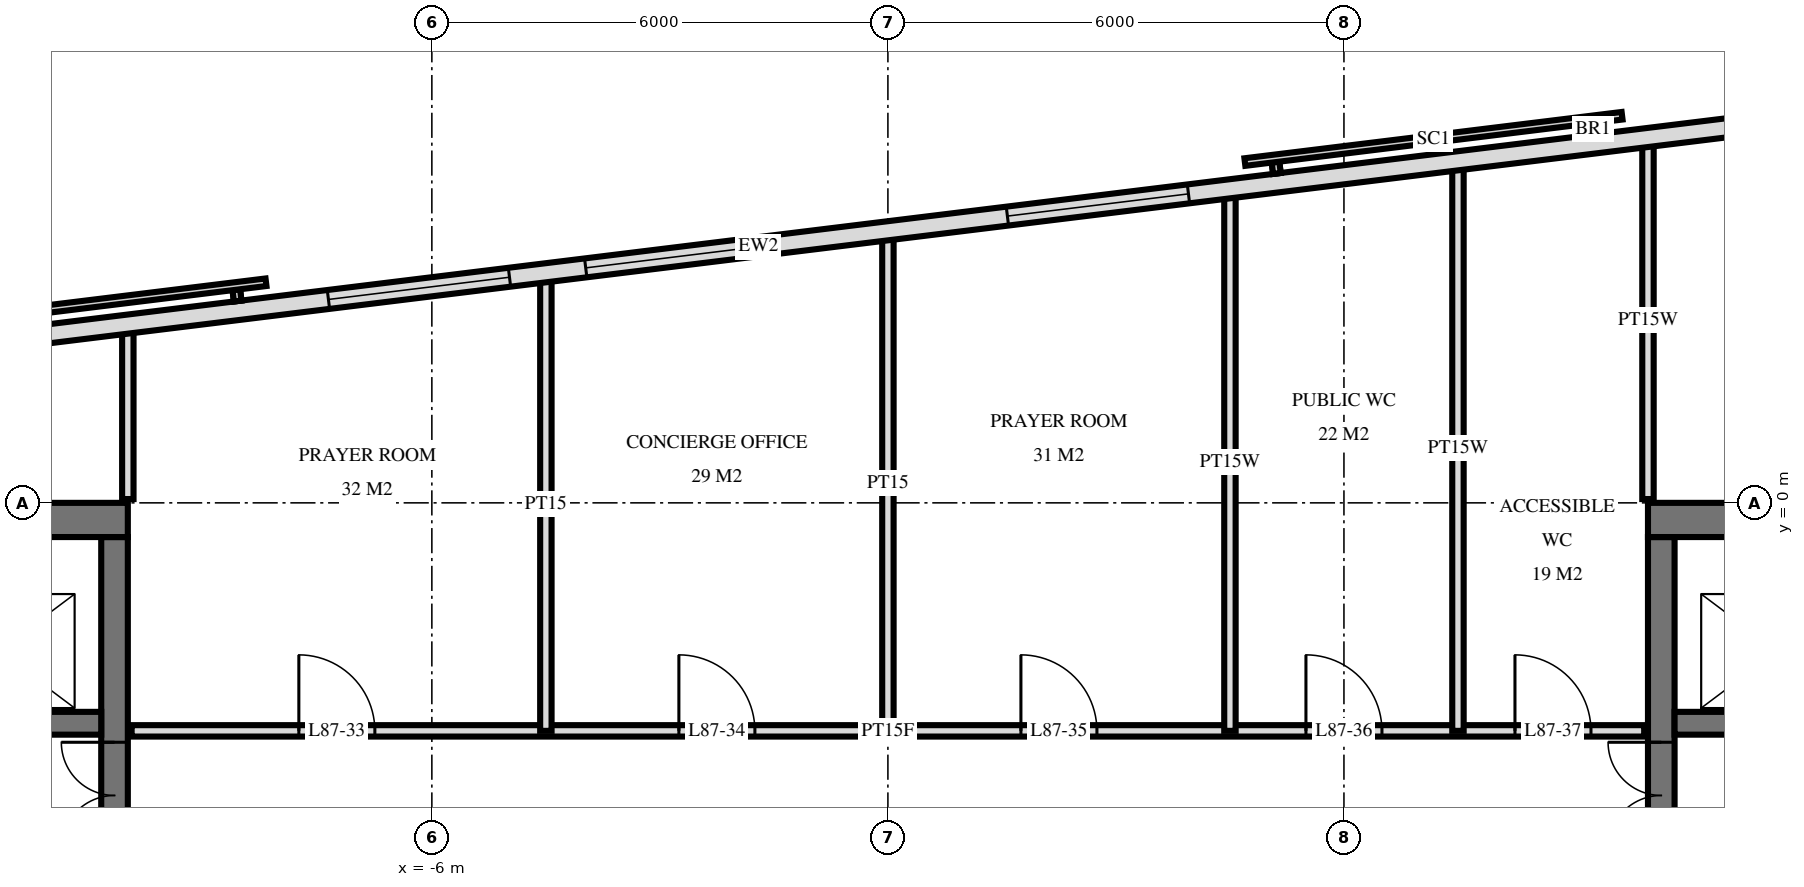
"""IFC4 building model, lengths in metres.
Left out: names, types, materials, properties, quantities, classifications, styles, units other than length and angle.
Written with IfcOpenShell. Run it as: python <this file> out.ifc"""

import sys

from ifc_helpers import new_model, si_unit, direction, frame, frame_2d, origin, place, context, subcontext, project, spatial, rectangle, extrude, element, fill, save


model = new_model("IFC4")
c1 = context("Model", 3, precision=1e-05, world=origin(), true_north=direction((0.0, 1.0)))
c2 = subcontext(c1, "Body", "Model", "MODEL_VIEW")
j1 = project(units=[si_unit("LENGTHUNIT", "METRE"), si_unit("PLANEANGLEUNIT", "RADIAN")], contexts=[c1])
p1 = place(None, origin())
s1 = spatial("IfcSite", under=j1, at=p1, CompositionType="ELEMENT")
p2 = place(p1, origin())
s2 = spatial("IfcBuilding", under=s1, at=p2, CompositionType="ELEMENT")
p3 = place(p2, frame((0.0, 0.0, 330.6)))
s3 = spatial("IfcBuildingStorey", under=s2, at=p3, CompositionType="ELEMENT", Elevation=330.6)
p4 = place(p3, frame((-19.5, -0.225, 0.0), z_axis=(0.0, 0.0, 1.0), x_axis=(1.0, 0.0, 0.0)))
e1 = element("IfcWall", 1, at=p4, inside=s3, PredefinedType="SHEAR", context=c2, shape_type="SweptSolid", body=[
    extrude(rectangle(XDim=9.5, YDim=0.45, at=frame_2d((4.75, 0.0))), origin(), (0.0, 0.0, 1.0), 4.0),
])
p5 = place(p3, frame((-10.175, -14.55, 0.0), z_axis=(0.0, 0.0, 1.0), x_axis=(0.0, 1.0, 0.0)))
e2 = element("IfcWall", 2, at=p5, inside=s3, PredefinedType="SHEAR", context=c2, shape_type="SweptSolid", body=[
    extrude(rectangle(XDim=14.1, YDim=0.35, at=frame_2d((7.05, 0.0))), origin(), (0.0, 0.0, 1.0), 4.0),
])
p6 = place(p5, frame((8.4, 0.0, 0.0)))
e3 = element("IfcOpeningElement", 3, at=p6, cuts=e2, PredefinedType="OPENING", context=c2, shape_type="SweptSolid", body=[
    extrude(rectangle(XDim=1.4, YDim=2.4, at=frame_2d((0.7, 1.2))), frame((0.0, 0.185, 0.0), z_axis=(0.0, -1.0, 0.0), x_axis=(1.0, 0.0, 0.0)), (0.0, 0.0, 1.0), 0.37),
])
p7 = place(p5, frame((10.0, 0.0, 0.0)))
e4 = element("IfcOpeningElement", 4, at=p7, cuts=e2, PredefinedType="OPENING", context=c2, shape_type="SweptSolid", body=[
    extrude(rectangle(XDim=1.4, YDim=2.4, at=frame_2d((0.7, 1.2))), frame((0.0, 0.185, 0.0), z_axis=(0.0, -1.0, 0.0), x_axis=(1.0, 0.0, 0.0)), (0.0, 0.0, 1.0), 0.37),
])
p8 = place(p5, frame((4.0, 0.0, 0.0)))
e5 = element("IfcOpeningElement", 5, at=p8, cuts=e2, PredefinedType="OPENING", context=c2, shape_type="SweptSolid", body=[
    extrude(rectangle(XDim=1.2, YDim=2.1, at=frame_2d((0.6, 1.05))), frame((0.0, 0.185, 0.0), z_axis=(0.0, -1.0, 0.0), x_axis=(1.0, 0.0, 0.0)), (0.0, 0.0, 1.0), 0.37),
])
p9 = place(p3, frame((-19.05, -2.9, 0.0), z_axis=(0.0, 0.0, 1.0), x_axis=(1.0, 0.0, 0.0)))
e6 = element("IfcWall", 6, at=p9, inside=s3, PredefinedType="SHEAR", context=c2, shape_type="SweptSolid", body=[
    extrude(rectangle(XDim=8.7, YDim=0.3, at=frame_2d((4.35, 0.0))), origin(), (0.0, 0.0, 1.0), 4.0),
])
p10 = place(p9, frame((6.8, 0.0, 0.0)))
e7 = element("IfcOpeningElement", 7, at=p10, cuts=e6, PredefinedType="OPENING", context=c2, shape_type="SweptSolid", body=[
    extrude(rectangle(XDim=1.1, YDim=2.1, at=frame_2d((0.55, 1.05))), frame((0.0, 0.16, 0.0), z_axis=(0.0, -1.0, 0.0), x_axis=(1.0, 0.0, 0.0)), (0.0, 0.0, 1.0), 0.32),
])
p11 = place(p9, frame((3.8, 0.0, 0.0)))
e8 = element("IfcOpeningElement", 8, at=p11, cuts=e6, PredefinedType="OPENING", context=c2, shape_type="SweptSolid", body=[
    extrude(rectangle(XDim=1.1, YDim=2.1, at=frame_2d((0.55, 1.05))), frame((0.0, 0.16, 0.0), z_axis=(0.0, -1.0, 0.0), x_axis=(1.0, 0.0, 0.0)), (0.0, 0.0, 1.0), 0.32),
])
p12 = place(p9, frame((1.613, 0.0, 0.0)))
e9 = element("IfcOpeningElement", 9, at=p12, cuts=e6, PredefinedType="OPENING", context=c2, shape_type="SweptSolid", body=[
    extrude(rectangle(XDim=0.9, YDim=2.1, at=frame_2d((0.45, 1.05))), frame((0.0, 0.16, 0.0), z_axis=(0.0, -1.0, 0.0), x_axis=(1.0, 0.0, 0.0)), (0.0, 0.0, 1.0), 0.32),
])
p13 = place(p9, frame((0.188, 0.0, 0.0)))
e10 = element("IfcOpeningElement", 10, at=p13, cuts=e6, PredefinedType="OPENING", context=c2, shape_type="SweptSolid", body=[
    extrude(rectangle(XDim=0.9, YDim=2.1, at=frame_2d((0.45, 1.05))), frame((0.0, 0.16, 0.0), z_axis=(0.0, -1.0, 0.0), x_axis=(1.0, 0.0, 0.0)), (0.0, 0.0, 1.0), 0.32),
])
p14 = place(p3, frame((10.0, -0.225, 0.0), z_axis=(0.0, 0.0, 1.0), x_axis=(1.0, 0.0, 0.0)))
e11 = element("IfcWall", 11, at=p14, inside=s3, PredefinedType="SHEAR", context=c2, shape_type="SweptSolid", body=[
    extrude(rectangle(XDim=9.5, YDim=0.45, at=frame_2d((4.75, 0.0))), origin(), (0.0, 0.0, 1.0), 4.0),
])
p15 = place(p3, frame((10.175, -14.55, 0.0), z_axis=(0.0, 0.0, 1.0), x_axis=(0.0, 1.0, 0.0)))
e12 = element("IfcWall", 12, at=p15, inside=s3, PredefinedType="SHEAR", context=c2, shape_type="SweptSolid", body=[
    extrude(rectangle(XDim=14.1, YDim=0.35, at=frame_2d((7.05, 0.0))), origin(), (0.0, 0.0, 1.0), 4.0),
])
p16 = place(p15, frame((8.4, 0.0, 0.0)))
e13 = element("IfcOpeningElement", 13, at=p16, cuts=e12, PredefinedType="OPENING", context=c2, shape_type="SweptSolid", body=[
    extrude(rectangle(XDim=1.4, YDim=2.4, at=frame_2d((0.7, 1.2))), frame((0.0, 0.185, 0.0), z_axis=(0.0, -1.0, 0.0), x_axis=(1.0, 0.0, 0.0)), (0.0, 0.0, 1.0), 0.37),
])
p17 = place(p15, frame((10.0, 0.0, 0.0)))
e14 = element("IfcOpeningElement", 14, at=p17, cuts=e12, PredefinedType="OPENING", context=c2, shape_type="SweptSolid", body=[
    extrude(rectangle(XDim=1.4, YDim=2.4, at=frame_2d((0.7, 1.2))), frame((0.0, 0.185, 0.0), z_axis=(0.0, -1.0, 0.0), x_axis=(1.0, 0.0, 0.0)), (0.0, 0.0, 1.0), 0.37),
])
p18 = place(p15, frame((4.0, 0.0, 0.0)))
e15 = element("IfcOpeningElement", 15, at=p18, cuts=e12, PredefinedType="OPENING", context=c2, shape_type="SweptSolid", body=[
    extrude(rectangle(XDim=1.2, YDim=2.1, at=frame_2d((0.6, 1.05))), frame((0.0, 0.185, 0.0), z_axis=(0.0, -1.0, 0.0), x_axis=(1.0, 0.0, 0.0)), (0.0, 0.0, 1.0), 0.37),
])
p19 = place(p3, frame((10.35, -2.9, 0.0), z_axis=(0.0, 0.0, 1.0), x_axis=(1.0, 0.0, 0.0)))
e16 = element("IfcWall", 16, at=p19, inside=s3, PredefinedType="SHEAR", context=c2, shape_type="SweptSolid", body=[
    extrude(rectangle(XDim=8.7, YDim=0.3, at=frame_2d((4.35, 0.0))), origin(), (0.0, 0.0, 1.0), 4.0),
])
p20 = place(p19, frame((0.8, 0.0, 0.0)))
e17 = element("IfcOpeningElement", 17, at=p20, cuts=e16, PredefinedType="OPENING", context=c2, shape_type="SweptSolid", body=[
    extrude(rectangle(XDim=1.1, YDim=2.1, at=frame_2d((0.55, 1.05))), frame((0.0, 0.16, 0.0), z_axis=(0.0, -1.0, 0.0), x_axis=(1.0, 0.0, 0.0)), (0.0, 0.0, 1.0), 0.32),
])
p21 = place(p19, frame((3.8, 0.0, 0.0)))
e18 = element("IfcOpeningElement", 18, at=p21, cuts=e16, PredefinedType="OPENING", context=c2, shape_type="SweptSolid", body=[
    extrude(rectangle(XDim=1.1, YDim=2.1, at=frame_2d((0.55, 1.05))), frame((0.0, 0.16, 0.0), z_axis=(0.0, -1.0, 0.0), x_axis=(1.0, 0.0, 0.0)), (0.0, 0.0, 1.0), 0.32),
])
p22 = place(p19, frame((6.188, 0.0, 0.0)))
e19 = element("IfcOpeningElement", 19, at=p22, cuts=e16, PredefinedType="OPENING", context=c2, shape_type="SweptSolid", body=[
    extrude(rectangle(XDim=0.9, YDim=2.1, at=frame_2d((0.45, 1.05))), frame((0.0, 0.16, 0.0), z_axis=(0.0, -1.0, 0.0), x_axis=(1.0, 0.0, 0.0)), (0.0, 0.0, 1.0), 0.32),
])
p23 = place(p19, frame((7.613, 0.0, 0.0)))
e20 = element("IfcOpeningElement", 20, at=p23, cuts=e16, PredefinedType="OPENING", context=c2, shape_type="SweptSolid", body=[
    extrude(rectangle(XDim=0.9, YDim=2.1, at=frame_2d((0.45, 1.05))), frame((0.0, 0.16, 0.0), z_axis=(0.0, -1.0, 0.0), x_axis=(1.0, 0.0, 0.0)), (0.0, 0.0, 1.0), 0.32),
])
p24 = place(p3, frame((16.138, 5.561, 0.0), z_axis=(0.0, 0.0, 1.0), x_axis=(-0.992546726876, -0.121864658405, 0.0)))
e21 = element("IfcWall", 21, at=p24, inside=s3, PredefinedType="SOLIDWALL", context=c2, shape_type="SweptSolid", body=[
    extrude(rectangle(XDim=35.951, YDim=0.25, at=frame_2d((17.975, 0.0))), origin(), (0.0, 0.0, 1.0), 3.72),
])
p25 = place(p24, frame((12.275, 0.0, 0.0)))
e22 = element("IfcOpeningElement", 22, at=p25, cuts=e21, PredefinedType="OPENING", context=c2, shape_type="SweptSolid", body=[
    extrude(rectangle(XDim=2.4, YDim=2.4, at=frame_2d((1.2, 1.2))), frame((0.0, 0.135, 0.0), z_axis=(0.0, -1.0, 0.0), x_axis=(1.0, 0.0, 0.0)), (0.0, 0.0, 1.0), 0.27),
])
p26 = place(p24, frame((17.865, 0.0, 0.0)))
e23 = element("IfcOpeningElement", 23, at=p26, cuts=e21, PredefinedType="OPENING", context=c2, shape_type="SweptSolid", body=[
    extrude(rectangle(XDim=2.4, YDim=2.4, at=frame_2d((1.2, 1.2))), frame((0.0, 0.135, 0.0), z_axis=(0.0, -1.0, 0.0), x_axis=(1.0, 0.0, 0.0)), (0.0, 0.0, 1.0), 0.27),
])
p27 = place(p24, frame((21.275, 0.0, 0.0)))
e24 = element("IfcOpeningElement", 24, at=p27, cuts=e21, PredefinedType="OPENING", context=c2, shape_type="SweptSolid", body=[
    extrude(rectangle(XDim=2.4, YDim=2.4, at=frame_2d((1.2, 1.2))), frame((0.0, 0.135, 0.0), z_axis=(0.0, -1.0, 0.0), x_axis=(1.0, 0.0, 0.0)), (0.0, 0.0, 1.0), 0.27),
])
p28 = place(p3, frame((10.0, 0.05, 0.0), z_axis=(0.0, 0.0, 1.0), x_axis=(0.0, 1.0, 0.0)))
e25 = element("IfcWall", 25, at=p28, inside=s3, PredefinedType="PLUMBINGWALL", context=c2, shape_type="SweptSolid", body=[
    extrude(rectangle(XDim=4.702, YDim=0.15, at=frame_2d((2.351, 0.0))), origin(), (0.0, 0.0, 1.0), 3.72),
])
p29 = place(p3, frame((7.5, -3.0, 0.0), z_axis=(0.0, 0.0, 1.0), x_axis=(0.0, 1.0, 0.0)))
e26 = element("IfcWall", 26, at=p29, inside=s3, PredefinedType="PLUMBINGWALL", context=c2, shape_type="SweptSolid", body=[
    extrude(rectangle(XDim=7.445, YDim=0.15, at=frame_2d((3.723, 0.0))), origin(), (0.0, 0.0, 1.0), 3.72),
])
p30 = place(p3, frame((4.5, -3.0, 0.0), z_axis=(0.0, 0.0, 1.0), x_axis=(0.0, 1.0, 0.0)))
e27 = element("IfcWall", 27, at=p30, inside=s3, PredefinedType="PLUMBINGWALL", context=c2, shape_type="SweptSolid", body=[
    extrude(rectangle(XDim=7.077, YDim=0.15, at=frame_2d((3.539, 0.0))), origin(), (0.0, 0.0, 1.0), 3.72),
])
p31 = place(p3, frame((0.0, -3.0, 0.0), z_axis=(0.0, 0.0, 1.0), x_axis=(0.0, 1.0, 0.0)))
e28 = element("IfcWall", 28, at=p31, inside=s3, PredefinedType="PARTITIONING", context=c2, shape_type="SweptSolid", body=[
    extrude(rectangle(XDim=6.524, YDim=0.15, at=frame_2d((3.262, 0.0))), origin(), (0.0, 0.0, 1.0), 3.72),
])
p32 = place(p3, frame((-4.5, -3.0, 0.0), z_axis=(0.0, 0.0, 1.0), x_axis=(0.0, 1.0, 0.0)))
e29 = element("IfcWall", 29, at=p32, inside=s3, PredefinedType="PARTITIONING", context=c2, shape_type="SweptSolid", body=[
    extrude(rectangle(XDim=5.972, YDim=0.15, at=frame_2d((2.986, 0.0))), origin(), (0.0, 0.0, 1.0), 3.72),
])
p33 = place(p3, frame((-10.0, 0.05, 0.0), z_axis=(0.0, 0.0, 1.0), x_axis=(0.0, 1.0, 0.0)))
e30 = element("IfcWall", 30, at=p33, inside=s3, PredefinedType="PARTITIONING", context=c2, shape_type="SweptSolid", body=[
    extrude(rectangle(XDim=2.247, YDim=0.15, at=frame_2d((1.123, 0.0))), origin(), (0.0, 0.0, 1.0), 3.72),
])
p34 = place(p3, frame((-9.95, -3.0, 0.0), z_axis=(0.0, 0.0, 1.0), x_axis=(1.0, 0.0, 0.0)))
e31 = element("IfcWall", 31, at=p34, inside=s3, PredefinedType="PARTITIONING", context=c2, shape_type="SweptSolid", body=[
    extrude(rectangle(XDim=19.9, YDim=0.15, at=frame_2d((9.95, 0.0))), origin(), (0.0, 0.0, 1.0), 3.72),
])
p35 = place(p34, frame((2.2, 0.0, 0.0)))
e32 = element("IfcOpeningElement", 32, at=p35, cuts=e31, PredefinedType="OPENING", context=c2, shape_type="SweptSolid", body=[
    extrude(rectangle(XDim=1.0, YDim=2.1, at=frame_2d((0.5, 1.05))), frame((0.0, 0.085, 0.0), z_axis=(0.0, -1.0, 0.0), x_axis=(1.0, 0.0, 0.0)), (0.0, 0.0, 1.0), 0.17),
])
p36 = place(p34, frame((7.2, 0.0, 0.0)))
e33 = element("IfcOpeningElement", 33, at=p36, cuts=e31, PredefinedType="OPENING", context=c2, shape_type="SweptSolid", body=[
    extrude(rectangle(XDim=1.0, YDim=2.1, at=frame_2d((0.5, 1.05))), frame((0.0, 0.085, 0.0), z_axis=(0.0, -1.0, 0.0), x_axis=(1.0, 0.0, 0.0)), (0.0, 0.0, 1.0), 0.17),
])
p37 = place(p34, frame((11.7, 0.0, 0.0)))
e34 = element("IfcOpeningElement", 34, at=p37, cuts=e31, PredefinedType="OPENING", context=c2, shape_type="SweptSolid", body=[
    extrude(rectangle(XDim=1.0, YDim=2.1, at=frame_2d((0.5, 1.05))), frame((0.0, 0.085, 0.0), z_axis=(0.0, -1.0, 0.0), x_axis=(1.0, 0.0, 0.0)), (0.0, 0.0, 1.0), 0.17),
])
p38 = place(p34, frame((15.45, 0.0, 0.0)))
e35 = element("IfcOpeningElement", 35, at=p38, cuts=e31, PredefinedType="OPENING", context=c2, shape_type="SweptSolid", body=[
    extrude(rectangle(XDim=1.0, YDim=2.1, at=frame_2d((0.5, 1.05))), frame((0.0, 0.085, 0.0), z_axis=(0.0, -1.0, 0.0), x_axis=(1.0, 0.0, 0.0)), (0.0, 0.0, 1.0), 0.17),
])
p39 = place(p34, frame((18.2, 0.0, 0.0)))
e36 = element("IfcOpeningElement", 36, at=p39, cuts=e31, PredefinedType="OPENING", context=c2, shape_type="SweptSolid", body=[
    extrude(rectangle(XDim=1.0, YDim=2.1, at=frame_2d((0.5, 1.05))), frame((0.0, 0.085, 0.0), z_axis=(0.0, -1.0, 0.0), x_axis=(1.0, 0.0, 0.0)), (0.0, 0.0, 1.0), 0.17),
])
p40 = place(p25, origin())
e37 = element("IfcWindow", 37, at=p40, inside=s3, PartitioningType="SINGLE_PANEL", PredefinedType="WINDOW", context=c2, shape_type="SweptSolid", body=[
    extrude(rectangle(XDim=2.4, YDim=2.4, at=frame_2d((1.2, 1.2))), frame((0.0, 0.03, 0.0), z_axis=(0.0, -1.0, 0.0), x_axis=(1.0, 0.0, 0.0)), (0.0, 0.0, 1.0), 0.06),
])
fill(e22, e37)
p41 = place(p26, origin())
e38 = element("IfcWindow", 38, at=p41, inside=s3, PartitioningType="SINGLE_PANEL", PredefinedType="WINDOW", context=c2, shape_type="SweptSolid", body=[
    extrude(rectangle(XDim=2.4, YDim=2.4, at=frame_2d((1.2, 1.2))), frame((0.0, 0.03, 0.0), z_axis=(0.0, -1.0, 0.0), x_axis=(1.0, 0.0, 0.0)), (0.0, 0.0, 1.0), 0.06),
])
fill(e23, e38)
p42 = place(p27, origin())
e39 = element("IfcWindow", 39, at=p42, inside=s3, PartitioningType="SINGLE_PANEL", PredefinedType="WINDOW", context=c2, shape_type="SweptSolid", body=[
    extrude(rectangle(XDim=2.4, YDim=2.4, at=frame_2d((1.2, 1.2))), frame((0.0, 0.03, 0.0), z_axis=(0.0, -1.0, 0.0), x_axis=(1.0, 0.0, 0.0)), (0.0, 0.0, 1.0), 0.06),
])
fill(e24, e39)
p43 = place(p7, origin())
e40 = element("IfcDoor", 40, at=p43, inside=s3, OperationType="DOUBLE_DOOR_SINGLE_SWING", PredefinedType="DOOR", context=c2, shape_type="SweptSolid", body=[
    extrude(rectangle(XDim=1.4, YDim=2.4, at=frame_2d((0.7, 1.2))), frame((0.0, 0.025, 0.0), z_axis=(0.0, -1.0, 0.0), x_axis=(1.0, 0.0, 0.0)), (0.0, 0.0, 1.0), 0.05),
])
fill(e4, e40)
p44 = place(p17, origin())
e41 = element("IfcDoor", 41, at=p44, inside=s3, OperationType="DOUBLE_DOOR_SINGLE_SWING", PredefinedType="DOOR", context=c2, shape_type="SweptSolid", body=[
    extrude(rectangle(XDim=1.4, YDim=2.4, at=frame_2d((0.7, 1.2))), frame((0.0, 0.025, 0.0), z_axis=(0.0, -1.0, 0.0), x_axis=(1.0, 0.0, 0.0)), (0.0, 0.0, 1.0), 0.05),
])
fill(e14, e41)
p45 = place(p35, origin())
e42 = element("IfcDoor", 42, at=p45, inside=s3, OperationType="SINGLE_SWING_RIGHT", PredefinedType="DOOR", context=c2, shape_type="SweptSolid", body=[
    extrude(rectangle(XDim=1.0, YDim=2.1, at=frame_2d((0.5, 1.05))), frame((0.0, 0.025, 0.0), z_axis=(0.0, -1.0, 0.0), x_axis=(1.0, 0.0, 0.0)), (0.0, 0.0, 1.0), 0.05),
])
fill(e32, e42)
p46 = place(p36, origin())
e43 = element("IfcDoor", 43, at=p46, inside=s3, OperationType="SINGLE_SWING_RIGHT", PredefinedType="DOOR", context=c2, shape_type="SweptSolid", body=[
    extrude(rectangle(XDim=1.0, YDim=2.1, at=frame_2d((0.5, 1.05))), frame((0.0, 0.025, 0.0), z_axis=(0.0, -1.0, 0.0), x_axis=(1.0, 0.0, 0.0)), (0.0, 0.0, 1.0), 0.05),
])
fill(e33, e43)
p47 = place(p37, origin())
e44 = element("IfcDoor", 44, at=p47, inside=s3, OperationType="SINGLE_SWING_RIGHT", PredefinedType="DOOR", context=c2, shape_type="SweptSolid", body=[
    extrude(rectangle(XDim=1.0, YDim=2.1, at=frame_2d((0.5, 1.05))), frame((0.0, 0.025, 0.0), z_axis=(0.0, -1.0, 0.0), x_axis=(1.0, 0.0, 0.0)), (0.0, 0.0, 1.0), 0.05),
])
fill(e34, e44)
p48 = place(p38, origin())
e45 = element("IfcDoor", 45, at=p48, inside=s3, OperationType="SINGLE_SWING_RIGHT", PredefinedType="DOOR", context=c2, shape_type="SweptSolid", body=[
    extrude(rectangle(XDim=1.0, YDim=2.1, at=frame_2d((0.5, 1.05))), frame((0.0, 0.025, 0.0), z_axis=(0.0, -1.0, 0.0), x_axis=(1.0, 0.0, 0.0)), (0.0, 0.0, 1.0), 0.05),
])
fill(e35, e45)
p49 = place(p39, origin())
e46 = element("IfcDoor", 46, at=p49, inside=s3, OperationType="SINGLE_SWING_RIGHT", PredefinedType="DOOR", context=c2, shape_type="SweptSolid", body=[
    extrude(rectangle(XDim=1.0, YDim=2.1, at=frame_2d((0.5, 1.05))), frame((0.0, 0.025, 0.0), z_axis=(0.0, -1.0, 0.0), x_axis=(1.0, 0.0, 0.0)), (0.0, 0.0, 1.0), 0.05),
])
fill(e36, e46)
save(model, sys.argv[1])
